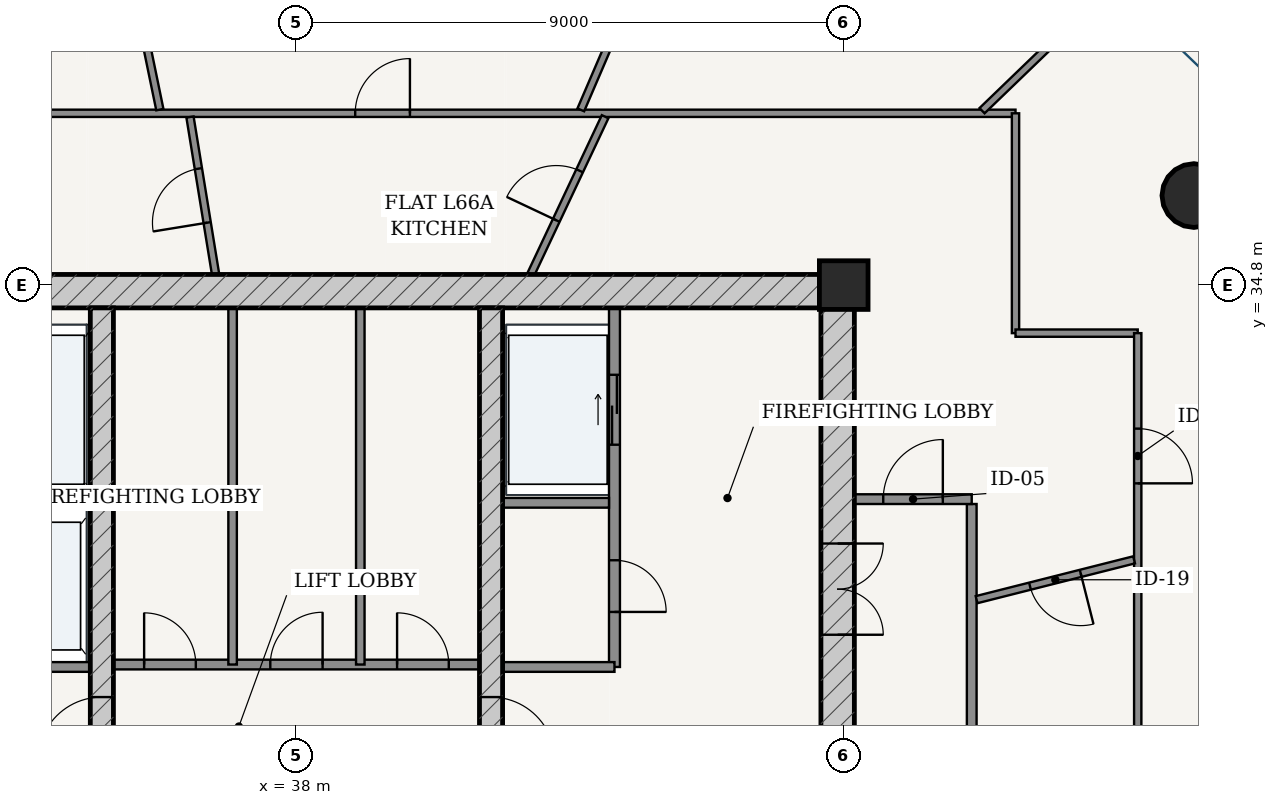
"""IFC4 building model, lengths in metres.
Left out: names, types, materials, properties, quantities, classifications, styles, units other than length and angle.
Written with IfcOpenShell. Run it as: python <this file> out.ifc"""

import sys

from ifc_helpers import new_model, si_unit, direction, frame, frame_2d, origin, origin_2d, place, context, subcontext, project, spatial, rectangle, hollow_circle, extrude, source, transform, mapped, element, fill, save


model = new_model("IFC4")
c1 = context("Model", 3, precision=1e-05, world=origin(), true_north=direction((-0.2419218956, 0.970295726276)))
c2 = subcontext(c1, "Body", "Model", "MODEL_VIEW")
j1 = project(units=[si_unit("LENGTHUNIT", "METRE"), si_unit("PLANEANGLEUNIT", "RADIAN")], contexts=[c1])
p1 = place(None, origin())
s1 = spatial("IfcSite", under=j1, at=p1, CompositionType="ELEMENT")
p2 = place(p1, origin())
s2 = spatial("IfcBuilding", under=s1, at=p2, CompositionType="ELEMENT")
p3 = place(p2, frame((0.0, 0.0, 251.95)))
s3 = spatial("IfcBuildingStorey", under=s2, at=p3, CompositionType="ELEMENT", Elevation=251.95)
p4 = place(p3, frame((47.0, 34.8, 0.0), z_axis=(0.0, 0.0, 1.0), x_axis=(1.0, 0.0, 0.0)))
e1 = element("IfcColumn", 1, at=p4, inside=s3, PredefinedType="COLUMN", context=c2, shape_type="SweptSolid", body=[
    extrude(rectangle(XDim=0.8, YDim=0.8, at=origin_2d()), origin(), (0.0, 0.0, 1.0), 3.75),
])
p5 = place(p3, frame((28.825, 34.7, 0.0), z_axis=(0.0, 0.0, 1.0), x_axis=(1.0, 0.0, 0.0)))
e2 = element("IfcWall", 2, at=p5, inside=s3, PredefinedType="SHEAR", context=c2, shape_type="SweptSolid", body=[
    extrude(rectangle(XDim=18.35, YDim=0.55, at=frame_2d((9.175, 0.0))), origin(), (0.0, 0.0, 1.0), 3.49),
])
p6 = place(p3, frame((46.9, 19.175, 0.0), z_axis=(0.0, 0.0, 1.0), x_axis=(0.0, 1.0, 0.0)))
e3 = element("IfcWall", 3, at=p6, inside=s3, PredefinedType="SHEAR", context=c2, shape_type="SweptSolid", body=[
    extrude(rectangle(XDim=15.25, YDim=0.55, at=frame_2d((7.625, 0.0))), origin(), (0.0, 0.0, 1.0), 3.49),
])
p7 = place(p6, frame((9.875, 0.0, 0.0)))
e4 = element("IfcOpeningElement", 4, at=p7, cuts=e3, PredefinedType="OPENING", context=c2, shape_type="SweptSolid", body=[
    extrude(rectangle(XDim=1.5, YDim=2.2, at=frame_2d((0.75, 1.1))), frame((0.0, 0.285, 0.0), z_axis=(0.0, -1.0, 0.0), x_axis=(1.0, 0.0, 0.0)), (0.0, 0.0, 1.0), 0.57),
])
p8 = place(p3, frame((34.8, 19.175, 0.0), z_axis=(0.0, 0.0, 1.0), x_axis=(0.0, 1.0, 0.0)))
e5 = element("IfcWall", 5, at=p8, inside=s3, PredefinedType="SHEAR", context=c2, shape_type="SweptSolid", body=[
    extrude(rectangle(XDim=15.25, YDim=0.38, at=frame_2d((7.625, 0.0))), origin(), (0.0, 0.0, 1.0), 3.49),
])
p9 = place(p8, frame((7.8, 0.0, 0.0)))
e6 = element("IfcOpeningElement", 6, at=p9, cuts=e5, PredefinedType="OPENING", context=c2, shape_type="SweptSolid", body=[
    extrude(rectangle(XDim=1.05, YDim=2.15, at=frame_2d((0.525, 1.075))), frame((0.0, 0.2, 0.0), z_axis=(0.0, -1.0, 0.0), x_axis=(1.0, 0.0, 0.0)), (0.0, 0.0, 1.0), 0.4),
])
p10 = place(p3, frame((41.2, 19.175, 0.0), z_axis=(0.0, 0.0, 1.0), x_axis=(0.0, 1.0, 0.0)))
e7 = element("IfcWall", 7, at=p10, inside=s3, PredefinedType="SHEAR", context=c2, shape_type="SweptSolid", body=[
    extrude(rectangle(XDim=15.25, YDim=0.38, at=frame_2d((7.625, 0.0))), origin(), (0.0, 0.0, 1.0), 3.49),
])
p11 = place(p10, frame((7.8, 0.0, 0.0)))
e8 = element("IfcOpeningElement", 8, at=p11, cuts=e7, PredefinedType="OPENING", context=c2, shape_type="SweptSolid", body=[
    extrude(rectangle(XDim=1.05, YDim=2.15, at=frame_2d((0.525, 1.075))), frame((0.0, 0.2, 0.0), z_axis=(0.0, -1.0, 0.0), x_axis=(1.0, 0.0, 0.0)), (0.0, 0.0, 1.0), 0.4),
])
p12 = place(p3, frame((52.759, 36.272, 0.0), z_axis=(0.0, 0.0, 1.0), x_axis=(1.0, 0.0, 0.0)))
e9 = element("IfcColumn", 9, at=p12, inside=s3, PredefinedType="COLUMN", context=c2, shape_type="SweptSolid", body=[
    extrude(hollow_circle(Radius=0.525, WallThickness=0.035, at=origin_2d()), origin(), (0.0, 0.0, 1.0), 3.75),
])
p13 = place(p3, frame((32.86, 31.22, 0.0), z_axis=(0.0, 0.0, 1.0), x_axis=(1.0, 0.0, 0.0)))
e10 = element("IfcWall", 10, at=p13, inside=s3, PredefinedType="PARTITIONING", context=c2, shape_type="SweptSolid", body=[
    extrude(rectangle(XDim=1.75, YDim=0.16, at=frame_2d((0.875, 0.0))), origin(), (0.0, 0.0, 1.0), 3.49),
])
p14 = place(p3, frame((32.77, 28.52, 0.0), z_axis=(0.0, 0.0, 1.0), x_axis=(1.0, 0.0, 0.0)))
e11 = element("IfcWall", 11, at=p14, inside=s3, PredefinedType="PARTITIONING", context=c2, shape_type="SweptSolid", body=[
    extrude(rectangle(XDim=1.84, YDim=0.16, at=frame_2d((0.92, 0.0))), origin(), (0.0, 0.0, 1.0), 3.49),
])
p15 = place(p3, frame((43.23, 28.52, 0.0), z_axis=(0.0, 0.0, 1.0), x_axis=(0.0, 1.0, 0.0)))
e12 = element("IfcWall", 12, at=p15, inside=s3, PredefinedType="PARTITIONING", context=c2, shape_type="SweptSolid", body=[
    extrude(rectangle(XDim=5.905, YDim=0.18, at=frame_2d((2.953, 0.0))), origin(), (0.0, 0.0, 1.0), 3.49),
])
p16 = place(p15, frame((0.905, 0.0, 0.0)))
e13 = element("IfcOpeningElement", 13, at=p16, cuts=e12, PredefinedType="OPENING", context=c2, shape_type="SweptSolid", body=[
    extrude(rectangle(XDim=0.85, YDim=2.1, at=frame_2d((0.425, 1.05))), frame((0.0, 0.1, 0.0), z_axis=(0.0, -1.0, 0.0), x_axis=(1.0, 0.0, 0.0)), (0.0, 0.0, 1.0), 0.2),
])
p17 = place(p15, frame((3.655, 0.0, 0.0)))
e14 = element("IfcOpeningElement", 14, at=p17, cuts=e12, PredefinedType="OPENING", context=c2, shape_type="SweptSolid", body=[
    extrude(rectangle(XDim=1.15, YDim=2.2, at=frame_2d((0.575, 1.1))), frame((0.0, 0.1, 0.0), z_axis=(0.0, -1.0, 0.0), x_axis=(1.0, 0.0, 0.0)), (0.0, 0.0, 1.0), 0.2),
])
p18 = place(p3, frame((41.39, 31.22, 0.0), z_axis=(0.0, 0.0, 1.0), x_axis=(1.0, 0.0, 0.0)))
e15 = element("IfcWall", 15, at=p18, inside=s3, PredefinedType="PARTITIONING", context=c2, shape_type="SweptSolid", body=[
    extrude(rectangle(XDim=1.75, YDim=0.16, at=frame_2d((0.875, 0.0))), origin(), (0.0, 0.0, 1.0), 3.49),
])
p19 = place(p3, frame((41.39, 28.52, 0.0), z_axis=(0.0, 0.0, 1.0), x_axis=(1.0, 0.0, 0.0)))
e16 = element("IfcWall", 16, at=p19, inside=s3, PredefinedType="PARTITIONING", context=c2, shape_type="SweptSolid", body=[
    extrude(rectangle(XDim=1.84, YDim=0.16, at=frame_2d((0.92, 0.0))), origin(), (0.0, 0.0, 1.0), 3.49),
])
p20 = place(p3, frame((34.99, 28.56, 0.0), z_axis=(0.0, 0.0, 1.0), x_axis=(1.0, 0.0, 0.0)))
e17 = element("IfcWall", 17, at=p20, inside=s3, PredefinedType="PARTITIONING", context=c2, shape_type="SweptSolid", body=[
    extrude(rectangle(XDim=6.02, YDim=0.16, at=frame_2d((3.01, 0.0))), origin(), (0.0, 0.0, 1.0), 3.49),
])
p21 = place(p20, frame((0.505, 0.0, 0.0)))
e18 = element("IfcOpeningElement", 18, at=p21, cuts=e17, PredefinedType="OPENING", context=c2, shape_type="SweptSolid", body=[
    extrude(rectangle(XDim=0.85, YDim=2.1, at=frame_2d((0.425, 1.05))), frame((0.0, 0.09, 0.0), z_axis=(0.0, -1.0, 0.0), x_axis=(1.0, 0.0, 0.0)), (0.0, 0.0, 1.0), 0.18),
])
p22 = place(p20, frame((2.58, 0.0, 0.0)))
e19 = element("IfcOpeningElement", 19, at=p22, cuts=e17, PredefinedType="OPENING", context=c2, shape_type="SweptSolid", body=[
    extrude(rectangle(XDim=0.86, YDim=2.1, at=frame_2d((0.43, 1.05))), frame((0.0, 0.09, 0.0), z_axis=(0.0, -1.0, 0.0), x_axis=(1.0, 0.0, 0.0)), (0.0, 0.0, 1.0), 0.18),
])
p23 = place(p20, frame((4.665, 0.0, 0.0)))
e20 = element("IfcOpeningElement", 20, at=p23, cuts=e17, PredefinedType="OPENING", context=c2, shape_type="SweptSolid", body=[
    extrude(rectangle(XDim=0.85, YDim=2.1, at=frame_2d((0.425, 1.05))), frame((0.0, 0.09, 0.0), z_axis=(0.0, -1.0, 0.0), x_axis=(1.0, 0.0, 0.0)), (0.0, 0.0, 1.0), 0.18),
])
for number, where, z_axis, x_axis in (
    (21, (36.95, 28.56, 0.0), (0.0, 0.0, 1.0), (0.0, 1.0, 0.0)),
    (22, (39.05, 28.56, 0.0), (0.0, 0.0, 1.0), (0.0, 1.0, 0.0)),
):
    element("IfcWall", number, at=place(p3, frame(where, z_axis=z_axis, x_axis=x_axis)), inside=s3, PredefinedType="PARTITIONING", context=c2, shape_type="SweptSolid", body=[
        extrude(rectangle(XDim=5.865, YDim=0.14, at=frame_2d((2.933, 0.0))), origin(), (0.0, 0.0, 1.0), 3.49),
    ])
p24 = place(p3, frame((49.105, 17.275, 0.0), z_axis=(0.0, 0.0, 1.0), x_axis=(0.0, 1.0, 0.0)))
e23 = element("IfcWall", 23, at=p24, inside=s3, PredefinedType="PARTITIONING", context=c2, shape_type="SweptSolid", body=[
    extrude(rectangle(XDim=13.925, YDim=0.16, at=frame_2d((6.962, 0.0))), origin(), (0.0, 0.0, 1.0), 3.015),
])
p25 = place(p3, frame((47.175, 31.28, 0.0), z_axis=(0.0, 0.0, 1.0), x_axis=(1.0, 0.0, 0.0)))
e24 = element("IfcWall", 24, at=p25, inside=s3, PredefinedType="PARTITIONING", context=c2, shape_type="SweptSolid", body=[
    extrude(rectangle(XDim=1.93, YDim=0.16, at=frame_2d((0.965, 0.0))), origin(), (0.0, 0.0, 1.0), 3.49),
])
p26 = place(p25, frame((0.475, 0.0, 0.0)))
e25 = element("IfcOpeningElement", 25, at=p26, cuts=e24, PredefinedType="OPENING", context=c2, shape_type="SweptSolid", body=[
    extrude(rectangle(XDim=0.98, YDim=2.2, at=frame_2d((0.49, 1.1))), frame((0.0, 0.09, 0.0), z_axis=(0.0, -1.0, 0.0), x_axis=(1.0, 0.0, 0.0)), (0.0, 0.0, 1.0), 0.18),
])
p27 = place(p3, frame((26.175, 37.625, 0.0), z_axis=(0.0, 0.0, 1.0), x_axis=(1.0, 0.0, 0.0)))
e26 = element("IfcWall", 26, at=p27, inside=s3, PredefinedType="PARTITIONING", context=c2, shape_type="SweptSolid", body=[
    extrude(rectangle(XDim=23.65, YDim=0.12, at=frame_2d((11.825, 0.0))), origin(), (0.0, 0.0, 1.0), 3.015),
])
p28 = place(p27, frame((12.791, 0.0, 0.0)))
e27 = element("IfcOpeningElement", 27, at=p28, cuts=e26, PredefinedType="OPENING", context=c2, shape_type="SweptSolid", body=[
    extrude(rectangle(XDim=0.9, YDim=2.15, at=frame_2d((0.45, 1.075))), frame((0.0, 0.07, 0.0), z_axis=(0.0, -1.0, 0.0), x_axis=(1.0, 0.0, 0.0)), (0.0, 0.0, 1.0), 0.14),
])
p29 = place(p27, frame((6.48, 0.0, 0.0)))
e28 = element("IfcOpeningElement", 28, at=p29, cuts=e26, PredefinedType="OPENING", context=c2, shape_type="SweptSolid", body=[
    extrude(rectangle(XDim=0.9, YDim=2.15, at=frame_2d((0.45, 1.075))), frame((0.0, 0.07, 0.0), z_axis=(0.0, -1.0, 0.0), x_axis=(1.0, 0.0, 0.0)), (0.0, 0.0, 1.0), 0.14),
])
p30 = place(p27, frame((1.831, 0.0, 0.0)))
e29 = element("IfcOpeningElement", 29, at=p30, cuts=e26, PredefinedType="OPENING", context=c2, shape_type="SweptSolid", body=[
    extrude(rectangle(XDim=0.9, YDim=2.15, at=frame_2d((0.45, 1.075))), frame((0.0, 0.07, 0.0), z_axis=(0.0, -1.0, 0.0), x_axis=(1.0, 0.0, 0.0)), (0.0, 0.0, 1.0), 0.14),
])
p31 = place(p3, frame((49.825, 37.625, 0.0), z_axis=(0.0, 0.0, 1.0), x_axis=(0.0, -1.0, 0.0)))
e30 = element("IfcWall", 30, at=p31, inside=s3, PredefinedType="PARTITIONING", context=c2, shape_type="SweptSolid", body=[
    extrude(rectangle(XDim=3.615, YDim=0.12, at=frame_2d((1.808, 0.0))), origin(), (0.0, 0.0, 1.0), 3.015),
])
p32 = place(p3, frame((49.825, 34.01, 0.0), z_axis=(0.0, 0.0, 1.0), x_axis=(1.0, 0.0, 0.0)))
e31 = element("IfcWall", 31, at=p32, inside=s3, PredefinedType="PARTITIONING", context=c2, shape_type="SweptSolid", body=[
    extrude(rectangle(XDim=2.01, YDim=0.12, at=frame_2d((1.005, 0.0))), origin(), (0.0, 0.0, 1.0), 3.209),
])
p33 = place(p3, frame((51.835, 34.01, 0.0), z_axis=(0.0, 0.0, 1.0), x_axis=(0.0, -1.0, 0.0)))
e32 = element("IfcWall", 32, at=p33, inside=s3, PredefinedType="PARTITIONING", context=c2, shape_type="SweptSolid", body=[
    extrude(rectangle(XDim=12.632, YDim=0.12, at=frame_2d((6.316, 0.0))), origin(), (0.0, 0.0, 1.0), 3.015),
])
p34 = place(p33, frame((1.57, 0.0, 0.0)))
e33 = element("IfcOpeningElement", 33, at=p34, cuts=e32, PredefinedType="OPENING", context=c2, shape_type="SweptSolid", body=[
    extrude(rectangle(XDim=0.9, YDim=2.15, at=frame_2d((0.45, 1.075))), frame((0.0, 0.07, 0.0), z_axis=(0.0, -1.0, 0.0), x_axis=(1.0, 0.0, 0.0)), (0.0, 0.0, 1.0), 0.14),
])
p35 = place(p3, frame((49.275, 37.668, 0.0), z_axis=(0.0, 0.0, 1.0), x_axis=(0.719954096891, 0.694021684366, 0.0)))
e34 = element("IfcWall", 34, at=p35, inside=s3, PredefinedType="PARTITIONING", context=c2, shape_type="SweptSolid", body=[
    extrude(rectangle(XDim=3.333, YDim=0.12, at=frame_2d((1.667, 0.0))), origin(), (0.0, 0.0, 1.0), 3.121),
])
p36 = place(p3, frame((42.676, 37.682, 0.0), z_axis=(0.0, 0.0, 1.0), x_axis=(0.394777489933, 0.918776759307, 0.0)))
e35 = element("IfcWall", 35, at=p36, inside=s3, PredefinedType="PARTITIONING", context=c2, shape_type="SweptSolid", body=[
    extrude(rectangle(XDim=6.9, YDim=0.12, at=frame_2d((3.45, 0.0))), origin(), (0.0, 0.0, 1.0), 3.121),
])
p37 = place(p36, frame((3.0, 0.0, 0.0)))
e36 = element("IfcOpeningElement", 36, at=p37, cuts=e35, PredefinedType="OPENING", context=c2, shape_type="SweptSolid", body=[
    extrude(rectangle(XDim=0.9, YDim=2.15, at=frame_2d((0.45, 1.075))), frame((0.0, 0.07, 0.0), z_axis=(0.0, -1.0, 0.0), x_axis=(1.0, 0.0, 0.0)), (0.0, 0.0, 1.0), 0.14),
])
p38 = place(p3, frame((35.754, 37.686, 0.0), z_axis=(0.0, 0.0, 1.0), x_axis=(-0.202105877204, 0.979363678313, 0.0)))
e37 = element("IfcWall", 37, at=p38, inside=s3, PredefinedType="PARTITIONING", context=c2, shape_type="SweptSolid", body=[
    extrude(rectangle(XDim=7.512, YDim=0.12, at=frame_2d((3.756, 0.0))), origin(), (0.0, 0.0, 1.0), 3.015),
])
p39 = place(p3, frame((49.185, 29.627, 0.0), z_axis=(0.0, 0.0, 1.0), x_axis=(0.969515658159, 0.2450293627, 0.0)))
e38 = element("IfcWall", 38, at=p39, inside=s3, PredefinedType="PARTITIONING", context=c2, shape_type="SweptSolid", body=[
    extrude(rectangle(XDim=2.671, YDim=0.12, at=frame_2d((1.336, 0.0))), origin(), (0.0, 0.0, 1.0), 3.209),
])
p40 = place(p39, frame((0.906, 0.0, 0.0)))
e39 = element("IfcOpeningElement", 39, at=p40, cuts=e38, PredefinedType="OPENING", context=c2, shape_type="SweptSolid", body=[
    extrude(rectangle(XDim=0.86, YDim=2.15, at=frame_2d((0.43, 1.075))), frame((0.0, 0.07, 0.0), z_axis=(0.0, -1.0, 0.0), x_axis=(1.0, 0.0, 0.0)), (0.0, 0.0, 1.0), 0.14),
])
p41 = place(p3, frame((41.854, 34.977, 0.0), z_axis=(0.0, 0.0, 1.0), x_axis=(0.42640827804, 0.904530806783, 0.0)))
e40 = element("IfcWall", 40, at=p41, inside=s3, PredefinedType="PARTITIONING", context=c2, shape_type="SweptSolid", body=[
    extrude(rectangle(XDim=2.866, YDim=0.12, at=frame_2d((1.433, 0.0))), origin(), (0.0, 0.0, 1.0), 3.49),
])
p42 = place(p41, frame((0.983, 0.0, 0.0)))
e41 = element("IfcOpeningElement", 41, at=p42, cuts=e40, PredefinedType="OPENING", context=c2, shape_type="SweptSolid", body=[
    extrude(rectangle(XDim=0.9, YDim=2.15, at=frame_2d((0.45, 1.075))), frame((0.0, 0.07, 0.0), z_axis=(0.0, -1.0, 0.0), x_axis=(1.0, 0.0, 0.0)), (0.0, 0.0, 1.0), 0.14),
])
p43 = place(p3, frame((36.67, 34.977, 0.0), z_axis=(0.0, 0.0, 1.0), x_axis=(-0.160605953374, 0.98701860557, 0.0)))
e42 = element("IfcWall", 42, at=p43, inside=s3, PredefinedType="PARTITIONING", context=c2, shape_type="SweptSolid", body=[
    extrude(rectangle(XDim=2.621, YDim=0.12, at=frame_2d((1.31, 0.0))), origin(), (0.0, 0.0, 1.0), 2.575),
])
p44 = place(p43, frame((0.86, 0.0, 0.0)))
e43 = element("IfcOpeningElement", 43, at=p44, cuts=e42, PredefinedType="OPENING", context=c2, shape_type="SweptSolid", body=[
    extrude(rectangle(XDim=0.9, YDim=2.15, at=frame_2d((0.45, 1.075))), frame((0.0, 0.07, 0.0), z_axis=(0.0, -1.0, 0.0), x_axis=(1.0, 0.0, 0.0)), (0.0, 0.0, 1.0), 0.14),
])
m1 = source(origin(), c2, "Body", "SweptSolid", [
    extrude(rectangle(XDim=1.5, YDim=2.2, at=frame_2d((0.75, 1.1))), frame((0.0, 0.025, 0.0), z_axis=(0.0, -1.0, 0.0), x_axis=(1.0, 0.0, 0.0)), (0.0, 0.0, 1.0), 0.05),
])
p45 = place(p7, frame((1.5, 0.0, 0.0), z_axis=(0.0, 0.0, 1.0), x_axis=(-1.0, 0.0, 0.0)))
e44 = element("IfcDoor", 44, at=p45, inside=s3, OperationType="DOUBLE_DOOR_SINGLE_SWING", PredefinedType="DOOR", context=c2, shape_type="MappedRepresentation", body=[
    mapped(m1, transform((0.0, 0.0, 0.0), scale=1.0)),
])
fill(e4, e44)
m2 = source(origin(), c2, "Body", "SweptSolid", [
    extrude(rectangle(XDim=1.05, YDim=2.15, at=frame_2d((0.525, 1.075))), frame((0.0, 0.025, 0.0), z_axis=(0.0, -1.0, 0.0), x_axis=(1.0, 0.0, 0.0)), (0.0, 0.0, 1.0), 0.05),
])
p46 = place(p9, origin())
e45 = element("IfcDoor", 45, at=p46, inside=s3, OperationType="SINGLE_SWING_LEFT", PredefinedType="DOOR", context=c2, shape_type="MappedRepresentation", body=[
    mapped(m2, transform((0.0, 0.0, 0.0), scale=1.0)),
])
fill(e6, e45)
p47 = place(p11, frame((1.05, 0.0, 0.0), z_axis=(0.0, 0.0, 1.0), x_axis=(-1.0, 0.0, 0.0)))
e46 = element("IfcDoor", 46, at=p47, inside=s3, OperationType="SINGLE_SWING_RIGHT", PredefinedType="DOOR", context=c2, shape_type="MappedRepresentation", body=[
    mapped(m2, transform((0.0, 0.0, 0.0), scale=1.0)),
])
fill(e8, e46)
m3 = source(origin(), c2, "Body", "SweptSolid", [
    extrude(rectangle(XDim=0.85, YDim=2.1, at=frame_2d((0.425, 1.05))), frame((0.0, 0.025, 0.0), z_axis=(0.0, -1.0, 0.0), x_axis=(1.0, 0.0, 0.0)), (0.0, 0.0, 1.0), 0.05),
])
p48 = place(p16, frame((0.85, 0.0, 0.0), z_axis=(0.0, 0.0, 1.0), x_axis=(-1.0, 0.0, 0.0)))
e47 = element("IfcDoor", 47, at=p48, inside=s3, OperationType="SINGLE_SWING_RIGHT", PredefinedType="DOOR", context=c2, shape_type="MappedRepresentation", body=[
    mapped(m3, transform((0.0, 0.0, 0.0), scale=1.0)),
])
fill(e13, e47)
p49 = place(p21, origin())
e48 = element("IfcDoor", 48, at=p49, inside=s3, OperationType="SINGLE_SWING_LEFT", PredefinedType="DOOR", context=c2, shape_type="MappedRepresentation", body=[
    mapped(m3, transform((0.0, 0.0, 0.0), scale=1.0)),
])
fill(e18, e48)
m4 = source(origin(), c2, "Body", "SweptSolid", [
    extrude(rectangle(XDim=0.86, YDim=2.1, at=frame_2d((0.43, 1.05))), frame((0.0, 0.025, 0.0), z_axis=(0.0, -1.0, 0.0), x_axis=(1.0, 0.0, 0.0)), (0.0, 0.0, 1.0), 0.05),
])
p50 = place(p22, origin())
e49 = element("IfcDoor", 49, at=p50, inside=s3, OperationType="SINGLE_SWING_RIGHT", PredefinedType="DOOR", context=c2, shape_type="MappedRepresentation", body=[
    mapped(m4, transform((0.0, 0.0, 0.0), scale=1.0)),
])
fill(e19, e49)
p51 = place(p23, origin())
e50 = element("IfcDoor", 50, at=p51, inside=s3, OperationType="SINGLE_SWING_LEFT", PredefinedType="DOOR", context=c2, shape_type="MappedRepresentation", body=[
    mapped(m3, transform((0.0, 0.0, 0.0), scale=1.0)),
])
fill(e20, e50)
m5 = source(origin(), c2, "Body", "SweptSolid", [
    extrude(rectangle(XDim=1.15, YDim=2.2, at=frame_2d((0.575, 1.1))), frame((0.0, 0.025, 0.0), z_axis=(0.0, -1.0, 0.0), x_axis=(1.0, 0.0, 0.0)), (0.0, 0.0, 1.0), 0.05),
])
p52 = place(p17, origin())
e51 = element("IfcDoor", 51, at=p52, inside=s3, OperationType="DOUBLE_DOOR_SLIDING", PredefinedType="DOOR", context=c2, shape_type="MappedRepresentation", body=[
    mapped(m5, transform((0.0, 0.0, 0.0), scale=1.0)),
])
fill(e14, e51)
m6 = source(origin(), c2, "Body", "SweptSolid", [
    extrude(rectangle(XDim=0.98, YDim=2.2, at=frame_2d((0.49, 1.1))), frame((0.0, 0.025, 0.0), z_axis=(0.0, -1.0, 0.0), x_axis=(1.0, 0.0, 0.0)), (0.0, 0.0, 1.0), 0.05),
])
p53 = place(p26, origin())
e52 = element("IfcDoor", 52, at=p53, inside=s3, OperationType="SINGLE_SWING_RIGHT", PredefinedType="DOOR", context=c2, shape_type="MappedRepresentation", body=[
    mapped(m6, transform((0.0, 0.0, 0.0), scale=1.0)),
])
fill(e25, e52)
m7 = source(origin(), c2, "Body", "SweptSolid", [
    extrude(rectangle(XDim=0.86, YDim=2.15, at=frame_2d((0.43, 1.075))), frame((0.0, 0.025, 0.0), z_axis=(0.0, -1.0, 0.0), x_axis=(1.0, 0.0, 0.0)), (0.0, 0.0, 1.0), 0.05),
])
p54 = place(p40, frame((0.86, 0.0, 0.0), z_axis=(0.0, 0.0, 1.0), x_axis=(-1.0, 0.0, 0.0)))
e53 = element("IfcDoor", 53, at=p54, inside=s3, OperationType="SINGLE_SWING_LEFT", PredefinedType="DOOR", context=c2, shape_type="MappedRepresentation", body=[
    mapped(m7, transform((0.0, 0.0, 0.0), scale=1.0)),
])
fill(e39, e53)
m8 = source(origin(), c2, "Body", "SweptSolid", [
    extrude(rectangle(XDim=0.9, YDim=2.15, at=frame_2d((0.45, 1.075))), frame((0.0, 0.025, 0.0), z_axis=(0.0, -1.0, 0.0), x_axis=(1.0, 0.0, 0.0)), (0.0, 0.0, 1.0), 0.05),
])
p55 = place(p34, origin())
e54 = element("IfcDoor", 54, at=p55, inside=s3, OperationType="SINGLE_SWING_RIGHT", PredefinedType="DOOR", context=c2, shape_type="MappedRepresentation", body=[
    mapped(m8, transform((0.0, 0.0, 0.0), scale=1.0)),
])
fill(e33, e54)
p56 = place(p42, origin())
e55 = element("IfcDoor", 55, at=p56, inside=s3, OperationType="SINGLE_SWING_LEFT", PredefinedType="DOOR", context=c2, shape_type="MappedRepresentation", body=[
    mapped(m8, transform((0.0, 0.0, 0.0), scale=1.0)),
])
fill(e41, e55)
p57 = place(p28, origin())
e56 = element("IfcDoor", 56, at=p57, inside=s3, OperationType="SINGLE_SWING_RIGHT", PredefinedType="DOOR", context=c2, shape_type="MappedRepresentation", body=[
    mapped(m8, transform((0.0, 0.0, 0.0), scale=1.0)),
])
fill(e27, e56)
p58 = place(p44, origin())
e57 = element("IfcDoor", 57, at=p58, inside=s3, OperationType="SINGLE_SWING_LEFT", PredefinedType="DOOR", context=c2, shape_type="MappedRepresentation", body=[
    mapped(m8, transform((0.0, 0.0, 0.0), scale=1.0)),
])
fill(e43, e57)
save(model, sys.argv[1])
